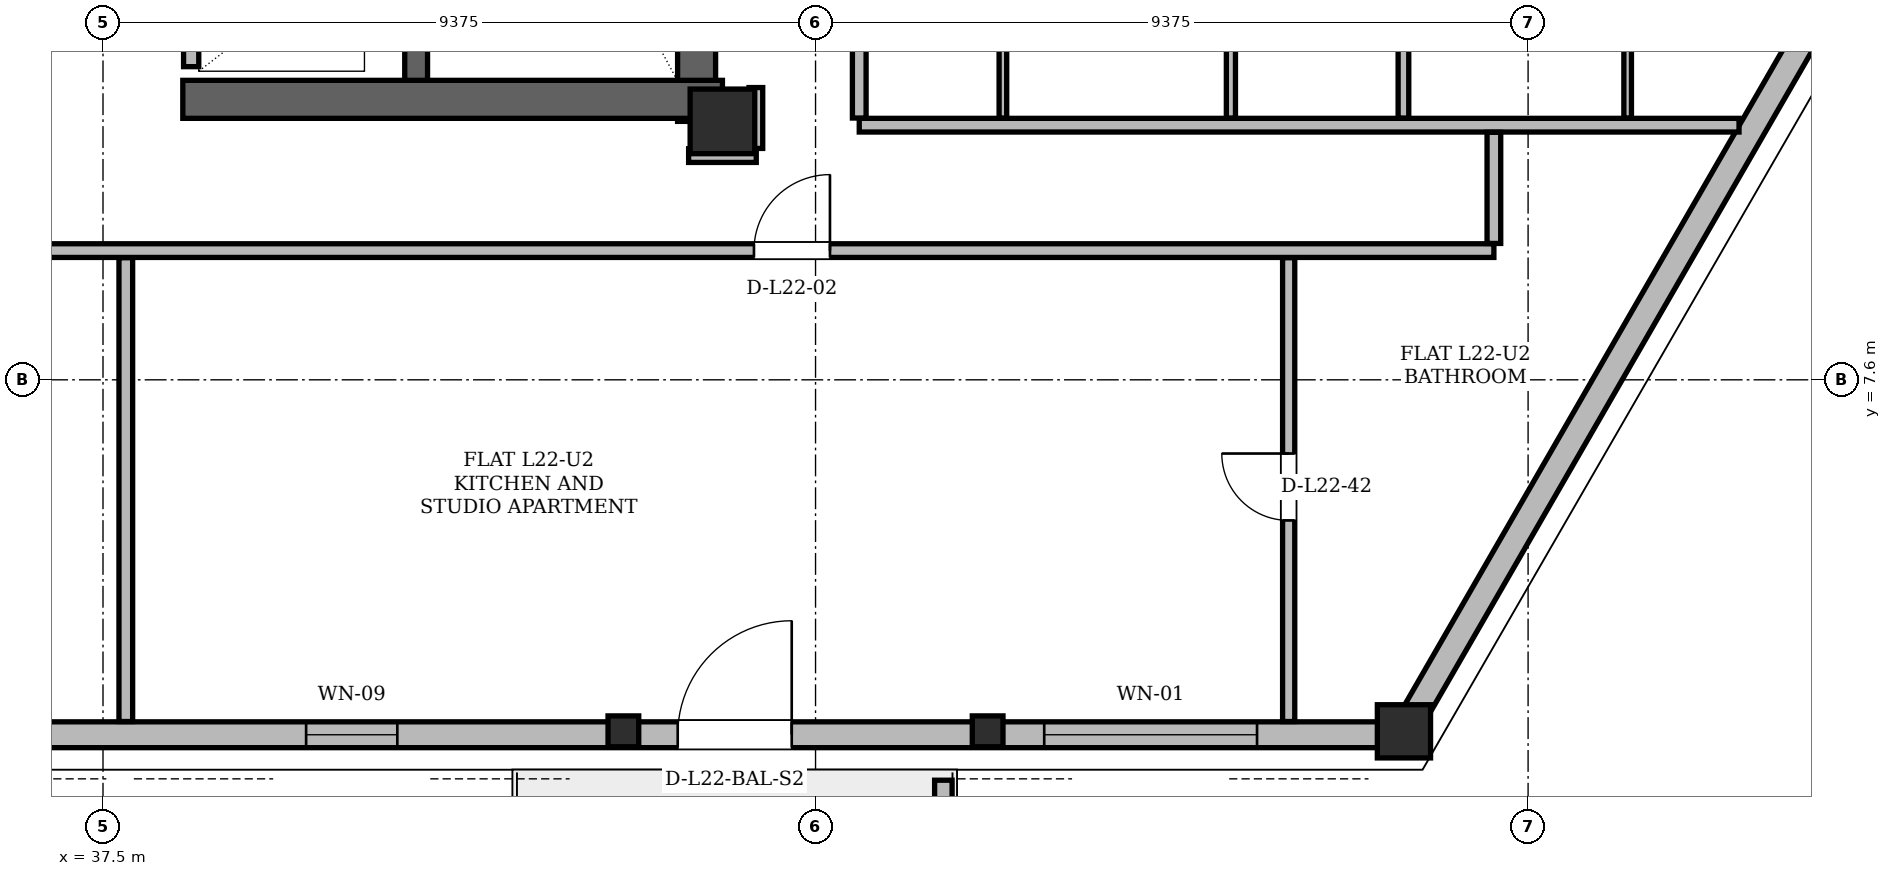
"""IFC4 building model, lengths in metres.
Left out: names, types, materials, properties, quantities, classifications, styles, units other than length and angle.
Written with IfcOpenShell. Run it as: python <this file> out.ifc"""

import sys

from ifc_helpers import new_model, si_unit, direction, frame, frame_2d, origin, origin_2d, place, context, subcontext, project, spatial, polyline, rectangle, hollow_rectangle, i_section, outline, extrude, element, fill, save


model = new_model("IFC4")
c1 = context("Model", 3, precision=1e-05, world=origin(), true_north=direction((0.0, 1.0)))
c2 = subcontext(c1, "Body", "Model", "MODEL_VIEW")
j1 = project(units=[si_unit("LENGTHUNIT", "METRE"), si_unit("PLANEANGLEUNIT", "RADIAN")], contexts=[c1])
p1 = place(None, origin())
s1 = spatial("IfcSite", under=j1, at=p1, CompositionType="ELEMENT")
p2 = place(p1, origin())
s2 = spatial("IfcBuilding", under=s1, at=p2, CompositionType="ELEMENT")
p3 = place(p2, frame((0.0, 0.0, 86.1)))
s3 = spatial("IfcBuildingStorey", under=s2, at=p3, CompositionType="ELEMENT", Elevation=86.1)
p4 = place(p3, frame((45.65, 11.0, 0.0), z_axis=(0.0, 0.0, 1.0), x_axis=(1.0, 0.0, 0.0)))
e1 = element("IfcColumn", 1, at=p4, inside=s3, PredefinedType="COLUMN", context=c2, shape_type="SweptSolid", body=[
    extrude(hollow_rectangle(XDim=0.85, YDim=0.85, WallThickness=0.07, at=origin_2d()), origin(), (0.0, 0.0, 1.0), 3.6),
])
p5 = place(p3, frame((54.596, 2.93, 0.004), z_axis=(0.011485192909, 0.02507713718, 0.999619541393), x_axis=(-0.909181442801, 0.41640017299, 0.0)))
e2 = element("IfcColumn", 2, at=p5, inside=s3, PredefinedType="COLUMN", context=c2, shape_type="SweptSolid", body=[
    extrude(hollow_rectangle(XDim=0.7, YDim=0.7, WallThickness=0.055, at=origin_2d()), origin(), (0.0, 0.0, 1.0), 3.593),
])
for number, where, z_axis, x_axis in (
    (3, (44.338, 2.93, 0.004), (0.005, 0.025, 1.0), (-0.983, 0.181, 0.0)),
    (4, (49.125, 2.93, 0.004), (0.008, 0.025, 1.0), (-0.955, 0.298, 0.0)),
):
    element("IfcColumn", number, at=place(p3, frame(where, z_axis=z_axis, x_axis=x_axis)), inside=s3, PredefinedType="COLUMN", context=c2, shape_type="SweptSolid", body=[
        extrude(i_section(OverallWidth=0.404, OverallDepth=0.406, WebThickness=0.027, FlangeThickness=0.044, at=origin_2d()), origin(), (0.0, 0.0, 1.0), 3.592),
    ])
p6 = place(p3, frame((45.31, 11.0, 0.0), z_axis=(0.0, 0.0, 1.0), x_axis=(0.0, 1.0, 0.0)))
e5 = element("IfcWall", 5, at=p6, inside=s3, PredefinedType="SHEAR", context=c2, shape_type="SweptSolid", body=[
    extrude(rectangle(XDim=13.3, YDim=0.5, at=frame_2d((6.65, 0.0))), origin(), (0.0, 0.0, 1.0), 3.36),
])
p7 = place(p3, frame((38.55, 11.29, 0.0), z_axis=(0.0, 0.0, 1.0), x_axis=(1.0, 0.0, 0.0)))
e6 = element("IfcWall", 6, at=p7, inside=s3, PredefinedType="SHEAR", context=c2, shape_type="SweptSolid", body=[
    extrude(rectangle(XDim=7.1, YDim=0.5, at=frame_2d((3.55, 0.0))), origin(), (0.0, 0.0, 1.0), 3.36),
])
p8 = place(p3, frame((41.62, 11.54, 0.0), z_axis=(0.0, 0.0, 1.0), x_axis=(0.0, 1.0, 0.0)))
e7 = element("IfcWall", 7, at=p8, inside=s3, PredefinedType="SHEAR", context=c2, shape_type="SweptSolid", body=[
    extrude(rectangle(XDim=7.62, YDim=0.3, at=frame_2d((3.81, 0.0))), origin(), (0.0, 0.0, 1.0), 3.36),
])
p9 = place(p3, frame((20.404, 2.93, 0.0), z_axis=(0.0, 0.0, 1.0), x_axis=(1.0, 0.0, 0.0)))
e8 = element("IfcWall", 8, at=p9, inside=s3, PredefinedType="SOLIDWALL", context=c2, shape_type="SweptSolid", body=[
    extrude(rectangle(XDim=34.192, YDim=0.34, at=frame_2d((17.096, 0.0))), origin(), (0.0, 0.0, 1.0), 2.578),
])
p10 = place(p9, frame((6.159, 0.0, 0.0)))
e9 = element("IfcOpeningElement", 9, at=p10, cuts=e8, PredefinedType="OPENING", context=c2, shape_type="SweptSolid", body=[
    extrude(rectangle(XDim=1.5, YDim=2.2, at=frame_2d((0.75, 1.1))), frame((0.0, 0.17, 0.0), z_axis=(0.0, -1.0, 0.0), x_axis=(1.0, 0.0, 0.0)), (0.0, 0.0, 1.0), 0.34),
])
p11 = place(p9, frame((24.658, 0.0, 0.0)))
e10 = element("IfcOpeningElement", 10, at=p11, cuts=e8, PredefinedType="OPENING", context=c2, shape_type="SweptSolid", body=[
    extrude(rectangle(XDim=1.5, YDim=2.2, at=frame_2d((0.75, 1.1))), frame((0.0, 0.17, 0.0), z_axis=(0.0, -1.0, 0.0), x_axis=(1.0, 0.0, 0.0)), (0.0, 0.0, 1.0), 0.34),
])
p12 = place(p9, frame((2.287, 0.0, 0.85)))
e11 = element("IfcOpeningElement", 11, at=p12, cuts=e8, PredefinedType="OPENING", context=c2, shape_type="SweptSolid", body=[
    extrude(rectangle(XDim=1.6, YDim=1.618, at=frame_2d((0.8, 0.809))), frame((0.0, 0.17, 0.0), z_axis=(0.0, -1.0, 0.0), x_axis=(1.0, 0.0, 0.0)), (0.0, 0.0, 1.0), 0.34),
])
p13 = place(p9, frame((12.774, 0.0, 0.85)))
e12 = element("IfcOpeningElement", 12, at=p13, cuts=e8, PredefinedType="OPENING", context=c2, shape_type="SweptSolid", body=[
    extrude(rectangle(XDim=3.0, YDim=1.618, at=frame_2d((1.5, 0.809))), frame((0.0, 0.17, 0.0), z_axis=(0.0, -1.0, 0.0), x_axis=(1.0, 0.0, 0.0)), (0.0, 0.0, 1.0), 0.34),
])
p14 = place(p9, frame((19.768, 0.0, 0.85)))
e13 = element("IfcOpeningElement", 13, at=p14, cuts=e8, PredefinedType="OPENING", context=c2, shape_type="SweptSolid", body=[
    extrude(rectangle(XDim=1.2, YDim=1.48, at=frame_2d((0.6, 0.74))), frame((0.0, 0.17, 0.0), z_axis=(0.0, -1.0, 0.0), x_axis=(1.0, 0.0, 0.0)), (0.0, 0.0, 1.0), 0.34),
])
p15 = place(p9, frame((29.48, 0.0, 0.85)))
e14 = element("IfcOpeningElement", 14, at=p15, cuts=e8, PredefinedType="OPENING", context=c2, shape_type="SweptSolid", body=[
    extrude(rectangle(XDim=2.8, YDim=1.618, at=frame_2d((1.4, 0.809))), frame((0.0, 0.17, 0.0), z_axis=(0.0, -1.0, 0.0), x_axis=(1.0, 0.0, 0.0)), (0.0, 0.0, 1.0), 0.34),
])
p16 = place(p3, frame((54.596, 2.93, 0.0), z_axis=(0.0, 0.0, 1.0), x_axis=(0.499993808156, 0.866028978618, 0.0)))
e15 = element("IfcWall", 15, at=p16, inside=s3, PredefinedType="SOLIDWALL", context=c2, shape_type="SweptSolid", body=[
    extrude(rectangle(XDim=12.643, YDim=0.34, at=frame_2d((6.321, 0.0))), origin(), (0.0, 0.0, 1.0), 2.578),
])
p17 = place(p3, frame((48.557, 2.333, 0.0), z_axis=(0.0, 0.0, 1.0), x_axis=(0.0, -1.0, 0.0)))
e16 = element("IfcWall", 16, at=p17, inside=s3, PredefinedType="PARAPET", context=c2, shape_type="SweptSolid", body=[
    extrude(outline(polyline([(0.0, 0.0), (2.042, 0.0), (2.042, 1.1), (0.0, 1.32), (0.0, 0.0)])), frame((0.0, 0.115, 0.0), z_axis=(0.0, -1.0, 0.0), x_axis=(1.0, 0.0, 0.0)), (0.0, 0.0, 1.0), 0.23),
])
p18 = place(p3, frame((38.66, 11.72, 0.0), z_axis=(0.0, 0.0, 1.0), x_axis=(0.0, 1.0, 0.0)))
e17 = element("IfcWall", 17, at=p18, inside=s3, PredefinedType="PARTITIONING", context=c2, shape_type="SweptSolid", body=[
    extrude(rectangle(XDim=9.1, YDim=0.2, at=frame_2d((4.55, 0.0))), origin(), (0.0, 0.0, 1.0), 3.36),
])
p19 = place(p3, frame((19.2, 9.3, 0.0), z_axis=(0.0, 0.0, 1.0), x_axis=(1.0, 0.0, 0.0)))
e18 = element("IfcWall", 18, at=p19, inside=s3, PredefinedType="PARTITIONING", context=c2, shape_type="SweptSolid", body=[
    extrude(rectangle(XDim=36.6, YDim=0.18, at=frame_2d((18.3, 0.0))), origin(), (0.0, 0.0, 1.0), 2.814),
])
p20 = place(p19, frame((8.68, 0.0, 0.0)))
e19 = element("IfcOpeningElement", 19, at=p20, cuts=e18, PredefinedType="OPENING", context=c2, shape_type="SweptSolid", body=[
    extrude(rectangle(XDim=1.0, YDim=2.18, at=frame_2d((0.5, 1.09))), frame((0.0, 0.09, 0.0), z_axis=(0.0, -1.0, 0.0), x_axis=(1.0, 0.0, 0.0)), (0.0, 0.0, 1.0), 0.18),
])
p21 = place(p19, frame((26.865, 0.0, 0.0)))
e20 = element("IfcOpeningElement", 20, at=p21, cuts=e18, PredefinedType="OPENING", context=c2, shape_type="SweptSolid", body=[
    extrude(rectangle(XDim=1.0, YDim=2.18, at=frame_2d((0.5, 1.09))), frame((0.0, 0.09, 0.0), z_axis=(0.0, -1.0, 0.0), x_axis=(1.0, 0.0, 0.0)), (0.0, 0.0, 1.0), 0.18),
])
p22 = place(p3, frame((45.205, 10.55, 0.0), z_axis=(0.0, 0.0, 1.0), x_axis=(1.0, 0.0, 0.0)))
e21 = element("IfcWall", 21, at=p22, inside=s3, PredefinedType="PARTITIONING", context=c2, shape_type="SweptSolid", body=[
    extrude(rectangle(XDim=0.89, YDim=0.18, at=frame_2d((0.445, 0.0))), origin(), (0.0, 0.0, 1.0), 3.36),
])
p23 = place(p3, frame((47.45, 10.95, 0.0), z_axis=(0.0, 0.0, 1.0), x_axis=(1.0, 0.0, 0.0)))
e22 = element("IfcWall", 22, at=p23, inside=s3, PredefinedType="PARTITIONING", context=c2, shape_type="SweptSolid", body=[
    extrude(rectangle(XDim=11.575, YDim=0.18, at=frame_2d((5.788, 0.0))), origin(), (0.0, 0.0, 1.0), 3.36),
])
p24 = place(p3, frame((37.8, 3.104, 0.0), z_axis=(0.0, 0.0, 1.0), x_axis=(0.0, 1.0, 0.0)))
e23 = element("IfcWall", 23, at=p24, inside=s3, PredefinedType="PARTITIONING", context=c2, shape_type="SweptSolid", body=[
    extrude(rectangle(XDim=6.102, YDim=0.18, at=frame_2d((3.051, 0.0))), origin(), (0.0, 0.0, 1.0), 3.36),
])
p25 = place(p3, frame((46.09, 10.644, 0.0), z_axis=(0.0, 0.0, 1.0), x_axis=(0.0, 1.0, 0.0)))
e24 = element("IfcWall", 24, at=p25, inside=s3, PredefinedType="PARTITIONING", context=c2, shape_type="SweptSolid", body=[
    extrude(rectangle(XDim=0.801, YDim=0.18, at=frame_2d((0.4, 0.0))), origin(), (0.0, 0.0, 1.0), 2.814),
])
p26 = place(p3, frame((47.45, 11.044, 0.0), z_axis=(0.0, 0.0, 1.0), x_axis=(0.0, 1.0, 0.0)))
e25 = element("IfcWall", 25, at=p26, inside=s3, PredefinedType="PARTITIONING", context=c2, shape_type="SweptSolid", body=[
    extrude(rectangle(XDim=14.832, YDim=0.18, at=frame_2d((7.416, 0.0))), origin(), (0.0, 0.0, 1.0), 2.814),
])
p27 = place(p26, frame((4.578, 0.0, 0.0)))
e26 = element("IfcOpeningElement", 26, at=p27, cuts=e25, PredefinedType="OPENING", context=c2, shape_type="SweptSolid", body=[
    extrude(rectangle(XDim=1.0, YDim=2.18, at=frame_2d((0.5, 1.09))), frame((0.0, 0.09, 0.0), z_axis=(0.0, -1.0, 0.0), x_axis=(1.0, 0.0, 0.0)), (0.0, 0.0, 1.0), 0.18),
])
p28 = place(p26, frame((9.09, 0.0, 0.0)))
e27 = element("IfcOpeningElement", 27, at=p28, cuts=e25, PredefinedType="OPENING", context=c2, shape_type="SweptSolid", body=[
    extrude(rectangle(XDim=1.0, YDim=2.18, at=frame_2d((0.5, 1.09))), frame((0.0, 0.09, 0.0), z_axis=(0.0, -1.0, 0.0), x_axis=(1.0, 0.0, 0.0)), (0.0, 0.0, 1.0), 0.18),
])
p29 = place(p26, frame((13.539, 0.0, 0.0)))
e28 = element("IfcOpeningElement", 28, at=p29, cuts=e25, PredefinedType="OPENING", context=c2, shape_type="SweptSolid", body=[
    extrude(rectangle(XDim=1.0, YDim=2.18, at=frame_2d((0.5, 1.09))), frame((0.0, 0.09, 0.0), z_axis=(0.0, -1.0, 0.0), x_axis=(1.0, 0.0, 0.0)), (0.0, 0.0, 1.0), 0.18),
])
p30 = place(p3, frame((49.34, 11.044, 0.0), z_axis=(0.0, 0.0, 1.0), x_axis=(0.0, 1.0, 0.0)))
e29 = element("IfcWall", 29, at=p30, inside=s3, PredefinedType="PARTITIONING", context=c2, shape_type="SweptSolid", body=[
    extrude(rectangle(XDim=2.792, YDim=0.1, at=frame_2d((1.396, 0.0))), origin(), (0.0, 0.0, 1.0), 2.814),
])
p31 = place(p3, frame((52.34, 11.044, 0.0), z_axis=(0.0, 0.0, 1.0), x_axis=(0.0, 1.0, 0.0)))
e30 = element("IfcWall", 30, at=p31, inside=s3, PredefinedType="PARTITIONING", context=c2, shape_type="SweptSolid", body=[
    extrude(rectangle(XDim=2.792, YDim=0.12, at=frame_2d((1.396, 0.0))), origin(), (0.0, 0.0, 1.0), 2.814),
])
p32 = place(p3, frame((53.1, 3.104, 0.0), z_axis=(0.0, 0.0, 1.0), x_axis=(0.0, 1.0, 0.0)))
e31 = element("IfcWall", 31, at=p32, inside=s3, PredefinedType="PARTITIONING", context=c2, shape_type="SweptSolid", body=[
    extrude(rectangle(XDim=6.102, YDim=0.16, at=frame_2d((3.051, 0.0))), origin(), (0.0, 0.0, 1.0), 2.814),
])
p33 = place(p32, frame((2.646, 0.0, 0.0)))
e32 = element("IfcOpeningElement", 32, at=p33, cuts=e31, PredefinedType="OPENING", context=c2, shape_type="SweptSolid", body=[
    extrude(rectangle(XDim=0.88, YDim=2.08, at=frame_2d((0.44, 1.04))), frame((0.0, 0.08, 0.0), z_axis=(0.0, -1.0, 0.0), x_axis=(1.0, 0.0, 0.0)), (0.0, 0.0, 1.0), 0.16),
])
p34 = place(p3, frame((54.61, 11.044, 0.0), z_axis=(0.0, 0.0, 1.0), x_axis=(0.0, 1.0, 0.0)))
e33 = element("IfcWall", 33, at=p34, inside=s3, PredefinedType="PARTITIONING", context=c2, shape_type="SweptSolid", body=[
    extrude(rectangle(XDim=2.792, YDim=0.14, at=frame_2d((1.396, 0.0))), origin(), (0.0, 0.0, 1.0), 2.814),
])
p35 = place(p3, frame((55.8, 9.394, 0.0), z_axis=(0.0, 0.0, 1.0), x_axis=(0.0, 1.0, 0.0)))
e34 = element("IfcWall", 34, at=p35, inside=s3, PredefinedType="PARTITIONING", context=c2, shape_type="SweptSolid", body=[
    extrude(rectangle(XDim=1.462, YDim=0.18, at=frame_2d((0.731, 0.0))), origin(), (0.0, 0.0, 1.0), 3.36),
])
p36 = place(p3, frame((57.56, 11.044, 0.0), z_axis=(0.0, 0.0, 1.0), x_axis=(0.0, 1.0, 0.0)))
e35 = element("IfcWall", 35, at=p36, inside=s3, PredefinedType="PARTITIONING", context=c2, shape_type="SweptSolid", body=[
    extrude(rectangle(XDim=2.792, YDim=0.1, at=frame_2d((1.396, 0.0))), origin(), (0.0, 0.0, 1.0), 2.814),
])
p37 = place(p11, origin())
e36 = element("IfcDoor", 36, at=p37, inside=s3, OperationType="SINGLE_SWING_RIGHT", PredefinedType="DOOR", context=c2, shape_type="SweptSolid", body=[
    extrude(rectangle(XDim=1.5, YDim=2.2, at=frame_2d((0.75, 1.1))), frame((0.0, 0.025, 0.0), z_axis=(0.0, -1.0, 0.0), x_axis=(1.0, 0.0, 0.0)), (0.0, 0.0, 1.0), 0.05),
])
fill(e10, e36)
p38 = place(p14, origin())
e37 = element("IfcWindow", 37, at=p38, inside=s3, PartitioningType="SINGLE_PANEL", PredefinedType="WINDOW", context=c2, shape_type="SweptSolid", body=[
    extrude(rectangle(XDim=1.2, YDim=1.48, at=frame_2d((0.6, 0.74))), frame((0.0, 0.03, 0.0), z_axis=(0.0, -1.0, 0.0), x_axis=(1.0, 0.0, 0.0)), (0.0, 0.0, 1.0), 0.06),
])
fill(e13, e37)
p39 = place(p15, origin())
e38 = element("IfcWindow", 38, at=p39, inside=s3, PartitioningType="SINGLE_PANEL", PredefinedType="WINDOW", context=c2, shape_type="SweptSolid", body=[
    extrude(rectangle(XDim=2.8, YDim=1.618, at=frame_2d((1.4, 0.809))), frame((0.0, 0.03, 0.0), z_axis=(0.0, -1.0, 0.0), x_axis=(1.0, 0.0, 0.0)), (0.0, 0.0, 1.0), 0.06),
])
fill(e14, e38)
p40 = place(p21, origin())
e39 = element("IfcDoor", 39, at=p40, inside=s3, OperationType="SINGLE_SWING_RIGHT", PredefinedType="DOOR", context=c2, shape_type="SweptSolid", body=[
    extrude(rectangle(XDim=1.0, YDim=2.18, at=frame_2d((0.5, 1.09))), frame((0.0, 0.025, 0.0), z_axis=(0.0, -1.0, 0.0), x_axis=(1.0, 0.0, 0.0)), (0.0, 0.0, 1.0), 0.05),
])
fill(e20, e39)
p41 = place(p33, origin())
e40 = element("IfcDoor", 40, at=p41, inside=s3, OperationType="SINGLE_SWING_RIGHT", PredefinedType="DOOR", context=c2, shape_type="SweptSolid", body=[
    extrude(rectangle(XDim=0.88, YDim=2.08, at=frame_2d((0.44, 1.04))), frame((0.0, 0.025, 0.0), z_axis=(0.0, -1.0, 0.0), x_axis=(1.0, 0.0, 0.0)), (0.0, 0.0, 1.0), 0.05),
])
fill(e32, e40)
save(model, sys.argv[1])
